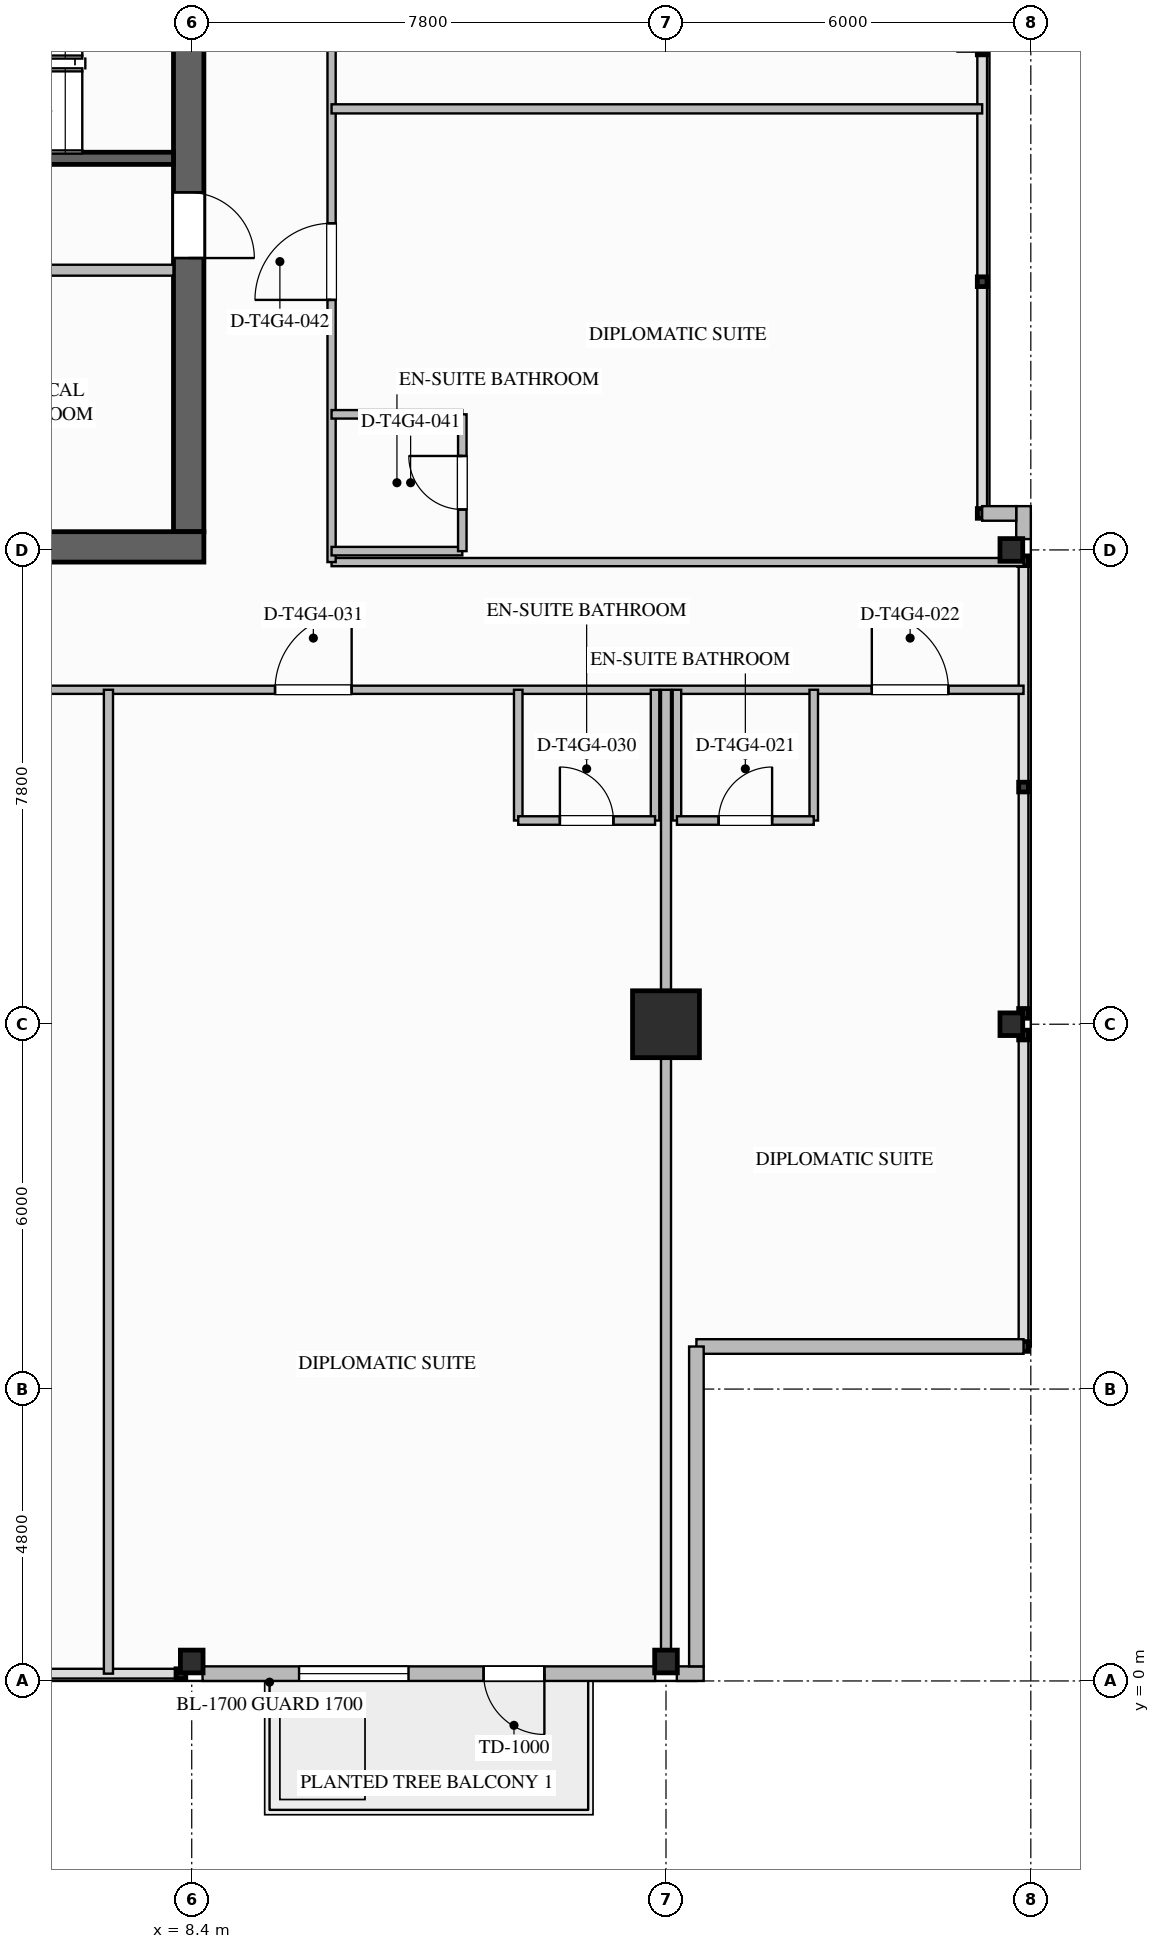
"""IFC4 building model, lengths in metres.
Left out: names, types, materials, properties, quantities, classifications, styles, units other than length and angle.
Written with IfcOpenShell. Run it as: python <this file> out.ifc"""

import sys

from ifc_helpers import new_model, si_unit, direction, frame, frame_2d, origin, origin_2d, place, context, subcontext, project, spatial, rectangle, i_section, extrude, element, fill, save


model = new_model("IFC4")
c1 = context("Model", 3, precision=1e-05, world=origin(), true_north=direction((0.0, 1.0)))
c2 = subcontext(c1, "Body", "Model", "MODEL_VIEW")
j1 = project(units=[si_unit("LENGTHUNIT", "METRE"), si_unit("PLANEANGLEUNIT", "RADIAN")], contexts=[c1])
p1 = place(None, origin())
s1 = spatial("IfcSite", under=j1, at=p1, CompositionType="ELEMENT")
p2 = place(p1, origin())
s2 = spatial("IfcBuilding", under=s1, at=p2, CompositionType="ELEMENT")
p3 = place(p2, frame((0.0, 0.0, 237.5)))
s3 = spatial("IfcBuildingStorey", under=s2, at=p3, CompositionType="ELEMENT", Elevation=237.5)
p4 = place(p3, frame((8.35, 35.1, 0.0), z_axis=(0.0, 0.0, 1.0), x_axis=(0.0, -1.0, 0.0)))
e1 = element("IfcWall", 1, at=p4, inside=s3, PredefinedType="SHEAR", context=c2, shape_type="SweptSolid", body=[
    extrude(rectangle(XDim=16.2, YDim=0.5, at=frame_2d((8.1, 0.0))), origin(), (0.0, 0.0, 1.0), 3.6),
])
p5 = place(p4, frame((3.08, 0.0, 0.0)))
e2 = element("IfcOpeningElement", 2, at=p5, cuts=e1, PredefinedType="OPENING", context=c2, shape_type="SweptSolid", body=[
    extrude(rectangle(XDim=1.12, YDim=2.1, at=frame_2d((0.56, 1.05))), frame((0.0, 0.26, 0.0), z_axis=(0.0, -1.0, 0.0), x_axis=(1.0, 0.0, 0.0)), (0.0, 0.0, 1.0), 0.52),
])
p6 = place(p4, frame((10.62, 0.0, 0.0)))
e3 = element("IfcOpeningElement", 3, at=p6, cuts=e1, PredefinedType="OPENING", context=c2, shape_type="SweptSolid", body=[
    extrude(rectangle(XDim=1.08, YDim=2.04, at=frame_2d((0.54, 1.02))), frame((0.0, 0.26, 0.0), z_axis=(0.0, -1.0, 0.0), x_axis=(1.0, 0.0, 0.0)), (0.0, 0.0, 1.0), 0.52),
])
p7 = place(p3, frame((8.6, 18.65, 0.0), z_axis=(0.0, 0.0, 1.0), x_axis=(-1.0, 0.0, 0.0)))
e4 = element("IfcWall", 4, at=p7, inside=s3, PredefinedType="SHEAR", context=c2, shape_type="SweptSolid", body=[
    extrude(rectangle(XDim=17.2, YDim=0.5, at=frame_2d((8.6, 0.0))), origin(), (0.0, 0.0, 1.0), 3.6),
])
p8 = place(p3, frame((16.2, 10.8, 0.0), z_axis=(0.0, 0.0, 1.0), x_axis=(1.0, 0.0, 0.0)))
e5 = element("IfcColumn", 5, at=p8, inside=s3, PredefinedType="COLUMN", context=c2, shape_type="SweptSolid", body=[
    extrude(rectangle(XDim=1.1, YDim=1.1, at=origin_2d()), origin(), (0.0, 0.0, 1.0), 3.6),
])
for number, where, z_axis, x_axis in (
    (6, (21.88, 10.8, 0.0), (0.0, 0.0, 1.0), (1.0, 0.0, 0.0)),
    (7, (21.88, 18.6, 0.0), (0.0, 0.0, 1.0), (1.0, 0.0, 0.0)),
    (8, (8.4, 0.32, 0.0), (0.0, 0.0, 1.0), (0.0, 1.0, 0.0)),
    (9, (16.2, 0.32, 0.0), (0.0, 0.0, 1.0), (0.0, 1.0, 0.0)),
):
    element("IfcColumn", number, at=place(p3, frame(where, z_axis=z_axis, x_axis=x_axis)), inside=s3, PredefinedType="COLUMN", context=c2, shape_type="SweptSolid", body=[
        extrude(i_section(OverallWidth=0.374, OverallDepth=0.372, WebThickness=0.016, FlangeThickness=0.026, FilletRadius=0.025, at=origin_2d()), origin(), (0.0, 0.0, 1.0), 3.597),
    ])
p9 = place(p3, frame((22.08, 19.32, 0.0), z_axis=(0.0, 0.0, 1.0), x_axis=(0.0, -1.0, 0.0)))
e10 = element("IfcWall", 10, at=p9, inside=s3, PredefinedType="STANDARD", context=c2, shape_type="SweptSolid", body=[
    extrude(rectangle(XDim=0.542, YDim=0.24, at=frame_2d((0.271, 0.0))), origin(), (0.0, 0.0, 1.0), 3.34),
])
p10 = place(p3, frame((16.022, 0.12, 0.0), z_axis=(0.0, 0.0, 1.0), x_axis=(-1.0, 0.0, 0.0)))
e11 = element("IfcWall", 11, at=p10, inside=s3, PredefinedType="STANDARD", context=c2, shape_type="SweptSolid", body=[
    extrude(rectangle(XDim=7.444, YDim=0.24, at=frame_2d((3.722, 0.0))), origin(), (0.0, 0.0, 1.0), 2.803),
])
p11 = place(p10, frame((1.822, 0.0, 0.0)))
e12 = element("IfcOpeningElement", 12, at=p11, cuts=e11, PredefinedType="OPENING", context=c2, shape_type="SweptSolid", body=[
    extrude(rectangle(XDim=1.0, YDim=2.2, at=frame_2d((0.5, 1.1))), frame((0.0, 0.13, 0.0), z_axis=(0.0, -1.0, 0.0), x_axis=(1.0, 0.0, 0.0)), (0.0, 0.0, 1.0), 0.26),
])
p12 = place(p10, frame((4.057, 0.0, 0.75)))
e13 = element("IfcOpeningElement", 13, at=p12, cuts=e11, PredefinedType="OPENING", context=c2, shape_type="SweptSolid", body=[
    extrude(rectangle(XDim=1.8, YDim=1.953, at=frame_2d((0.9, 0.977))), frame((0.0, 0.13, 0.0), z_axis=(0.0, -1.0, 0.0), x_axis=(1.0, 0.0, 0.0)), (0.0, 0.0, 1.0), 0.26),
])
p13 = place(p3, frame((16.82, 0.12, 0.0), z_axis=(0.0, 0.0, 1.0), x_axis=(-1.0, 0.0, 0.0)))
e14 = element("IfcWall", 14, at=p13, inside=s3, PredefinedType="STANDARD", context=c2, shape_type="SweptSolid", body=[
    extrude(rectangle(XDim=0.442, YDim=0.24, at=frame_2d((0.221, 0.0))), origin(), (0.0, 0.0, 1.0), 3.34),
])
p14 = place(p3, frame((22.08, 5.5, 0.0), z_axis=(0.0, 0.0, 1.0), x_axis=(-1.0, 0.0, 0.0)))
e15 = element("IfcWall", 15, at=p14, inside=s3, PredefinedType="STANDARD", context=c2, shape_type="SweptSolid", body=[
    extrude(rectangle(XDim=5.38, YDim=0.24, at=frame_2d((2.69, 0.0))), origin(), (0.0, 0.0, 1.0), 3.34),
])
p15 = place(p3, frame((16.7, 5.5, 0.0), z_axis=(0.0, 0.0, 1.0), x_axis=(0.0, -1.0, 0.0)))
e16 = element("IfcWall", 16, at=p15, inside=s3, PredefinedType="STANDARD", context=c2, shape_type="SweptSolid", body=[
    extrude(rectangle(XDim=5.26, YDim=0.24, at=frame_2d((2.63, 0.0))), origin(), (0.0, 0.0, 1.0), 3.34),
])
p16 = place(p3, frame((21.4, 19.2, 0.0), z_axis=(0.0, 0.0, 1.0), x_axis=(1.0, 0.0, 0.0)))
e17 = element("IfcWall", 17, at=p16, inside=s3, PredefinedType="STANDARD", context=c2, shape_type="SweptSolid", body=[
    extrude(rectangle(XDim=0.56, YDim=0.24, at=frame_2d((0.28, 0.0))), origin(), (0.0, 0.0, 1.0), 3.34),
])
p17 = place(p3, frame((0.0, 25.04, 0.0), z_axis=(0.0, 0.0, 1.0), x_axis=(1.0, 0.0, 0.0)))
e18 = element("IfcWall", 18, at=p17, inside=s3, PredefinedType="SOLIDWALL", context=c2, shape_type="SweptSolid", body=[
    extrude(rectangle(XDim=8.1, YDim=0.2, at=frame_2d((4.05, 0.0))), origin(), (0.0, 0.0, 1.0), 3.34),
])
p18 = place(p3, frame((-8.1, 23.2, 0.0), z_axis=(0.0, 0.0, 1.0), x_axis=(1.0, 0.0, 0.0)))
e19 = element("IfcWall", 19, at=p18, inside=s3, PredefinedType="SOLIDWALL", context=c2, shape_type="SweptSolid", body=[
    extrude(rectangle(XDim=16.2, YDim=0.18, at=frame_2d((8.1, 0.0))), origin(), (0.0, 0.0, 1.0), 3.34),
])
p19 = place(p18, frame((1.8, 0.0, 0.0)))
e20 = element("IfcOpeningElement", 20, at=p19, cuts=e19, PredefinedType="OPENING", context=c2, shape_type="SweptSolid", body=[
    extrude(rectangle(XDim=1.0, YDim=2.1, at=frame_2d((0.5, 1.05))), frame((0.0, 0.1, 0.0), z_axis=(0.0, -1.0, 0.0), x_axis=(1.0, 0.0, 0.0)), (0.0, 0.0, 1.0), 0.2),
])
p20 = place(p18, frame((7.6, 0.0, 0.0)))
e21 = element("IfcOpeningElement", 21, at=p20, cuts=e19, PredefinedType="OPENING", context=c2, shape_type="SweptSolid", body=[
    extrude(rectangle(XDim=1.0, YDim=2.1, at=frame_2d((0.5, 1.05))), frame((0.0, 0.1, 0.0), z_axis=(0.0, -1.0, 0.0), x_axis=(1.0, 0.0, 0.0)), (0.0, 0.0, 1.0), 0.2),
])
p21 = place(p18, frame((13.0, 0.0, 0.0)))
e22 = element("IfcOpeningElement", 22, at=p21, cuts=e19, PredefinedType="OPENING", context=c2, shape_type="SweptSolid", body=[
    extrude(rectangle(XDim=1.0, YDim=2.1, at=frame_2d((0.5, 1.05))), frame((0.0, 0.1, 0.0), z_axis=(0.0, -1.0, 0.0), x_axis=(1.0, 0.0, 0.0)), (0.0, 0.0, 1.0), 0.2),
])
p22 = place(p3, frame((-16.2, 16.3, 0.0), z_axis=(0.0, 0.0, 1.0), x_axis=(1.0, 0.0, 0.0)))
e23 = element("IfcWall", 23, at=p22, inside=s3, PredefinedType="PARTITIONING", context=c2, shape_type="SweptSolid", body=[
    extrude(rectangle(XDim=38.28, YDim=0.135, at=frame_2d((19.14, 0.0))), origin(), (0.0, 0.0, 1.0), 3.34),
])
p23 = place(p22, frame((35.785, 0.0, 0.0)))
e24 = element("IfcOpeningElement", 24, at=p23, cuts=e23, PredefinedType="OPENING", context=c2, shape_type="SweptSolid", body=[
    extrude(rectangle(XDim=1.26, YDim=2.2, at=frame_2d((0.63, 1.1))), frame((0.0, 0.077, 0.0), z_axis=(0.0, -1.0, 0.0), x_axis=(1.0, 0.0, 0.0)), (0.0, 0.0, 1.0), 0.155),
])
p24 = place(p22, frame((3.947, 0.0, 0.0)))
e25 = element("IfcOpeningElement", 25, at=p24, cuts=e23, PredefinedType="OPENING", context=c2, shape_type="SweptSolid", body=[
    extrude(rectangle(XDim=1.26, YDim=2.2, at=frame_2d((0.63, 1.1))), frame((0.0, 0.077, 0.0), z_axis=(0.0, -1.0, 0.0), x_axis=(1.0, 0.0, 0.0)), (0.0, 0.0, 1.0), 0.155),
])
p25 = place(p22, frame((11.105, 0.0, 0.0)))
e26 = element("IfcOpeningElement", 26, at=p25, cuts=e23, PredefinedType="OPENING", context=c2, shape_type="SweptSolid", body=[
    extrude(rectangle(XDim=1.02, YDim=2.15, at=frame_2d((0.51, 1.075))), frame((0.0, 0.077, 0.0), z_axis=(0.0, -1.0, 0.0), x_axis=(1.0, 0.0, 0.0)), (0.0, 0.0, 1.0), 0.155),
])
p26 = place(p22, frame((20.453, 0.0, 0.0)))
e27 = element("IfcOpeningElement", 27, at=p26, cuts=e23, PredefinedType="OPENING", context=c2, shape_type="SweptSolid", body=[
    extrude(rectangle(XDim=1.26, YDim=2.2, at=frame_2d((0.63, 1.1))), frame((0.0, 0.077, 0.0), z_axis=(0.0, -1.0, 0.0), x_axis=(1.0, 0.0, 0.0)), (0.0, 0.0, 1.0), 0.155),
])
p27 = place(p22, frame((25.97, 0.0, 0.0)))
e28 = element("IfcOpeningElement", 28, at=p27, cuts=e23, PredefinedType="OPENING", context=c2, shape_type="SweptSolid", body=[
    extrude(rectangle(XDim=1.26, YDim=2.2, at=frame_2d((0.63, 1.1))), frame((0.0, 0.077, 0.0), z_axis=(0.0, -1.0, 0.0), x_axis=(1.0, 0.0, 0.0)), (0.0, 0.0, 1.0), 0.155),
])
p28 = place(p3, frame((10.7, 18.4, 0.0), z_axis=(0.0, 0.0, 1.0), x_axis=(1.0, 0.0, 0.0)))
e29 = element("IfcWall", 29, at=p28, inside=s3, PredefinedType="PARTITIONING", context=c2, shape_type="SweptSolid", body=[
    extrude(rectangle(XDim=11.38, YDim=0.135, at=frame_2d((5.69, 0.0))), origin(), (0.0, 0.0, 1.0), 2.717),
])
p29 = place(p3, frame((10.7, 18.4, 0.0), z_axis=(0.0, 0.0, 1.0), x_axis=(0.0, 1.0, 0.0)))
e30 = element("IfcWall", 30, at=p29, inside=s3, PredefinedType="PARTITIONING", context=c2, shape_type="SweptSolid", body=[
    extrude(rectangle(XDim=17.2, YDim=0.135, at=frame_2d((8.6, 0.0))), origin(), (0.0, 0.0, 1.0), 3.34),
])
p30 = place(p29, frame((4.312, 0.0, 0.0)))
e31 = element("IfcOpeningElement", 31, at=p30, cuts=e30, PredefinedType="OPENING", context=c2, shape_type="SweptSolid", body=[
    extrude(rectangle(XDim=1.26, YDim=2.2, at=frame_2d((0.63, 1.1))), frame((0.0, 0.077, 0.0), z_axis=(0.0, -1.0, 0.0), x_axis=(1.0, 0.0, 0.0)), (0.0, 0.0, 1.0), 0.155),
])
p31 = place(p29, frame((10.482, 0.0, 0.0)))
e32 = element("IfcOpeningElement", 32, at=p31, cuts=e30, PredefinedType="OPENING", context=c2, shape_type="SweptSolid", body=[
    extrude(rectangle(XDim=1.26, YDim=2.2, at=frame_2d((0.63, 1.1))), frame((0.0, 0.077, 0.0), z_axis=(0.0, -1.0, 0.0), x_axis=(1.0, 0.0, 0.0)), (0.0, 0.0, 1.0), 0.155),
])
p32 = place(p3, frame((16.2, 0.12, 0.0), z_axis=(0.0, 0.0, 1.0), x_axis=(0.0, 1.0, 0.0)))
e33 = element("IfcWall", 33, at=p32, inside=s3, PredefinedType="PARTITIONING", context=c2, shape_type="SweptSolid", body=[
    extrude(rectangle(XDim=16.18, YDim=0.165, at=frame_2d((8.09, 0.0))), origin(), (0.0, 0.0, 1.0), 2.714),
])
p33 = place(p3, frame((16.38, 16.3, 0.0), z_axis=(0.0, 0.0, 1.0), x_axis=(0.0, -1.0, 0.0)))
e34 = element("IfcWall", 34, at=p33, inside=s3, PredefinedType="PLUMBINGWALL", context=c2, shape_type="SweptSolid", body=[
    extrude(rectangle(XDim=2.15, YDim=0.14, at=frame_2d((1.075, 0.0))), origin(), (0.0, 0.0, 1.0), 2.714),
])
p34 = place(p3, frame((18.63, 16.3, 0.0), z_axis=(0.0, 0.0, 1.0), x_axis=(0.0, -1.0, 0.0)))
e35 = element("IfcWall", 35, at=p34, inside=s3, PredefinedType="PLUMBINGWALL", context=c2, shape_type="SweptSolid", body=[
    extrude(rectangle(XDim=2.15, YDim=0.14, at=frame_2d((1.075, 0.0))), origin(), (0.0, 0.0, 1.0), 3.34),
])
p35 = place(p3, frame((16.38, 14.15, 0.0), z_axis=(0.0, 0.0, 1.0), x_axis=(1.0, 0.0, 0.0)))
e36 = element("IfcWall", 36, at=p35, inside=s3, PredefinedType="PLUMBINGWALL", context=c2, shape_type="SweptSolid", body=[
    extrude(rectangle(XDim=2.25, YDim=0.14, at=frame_2d((1.125, 0.0))), origin(), (0.0, 0.0, 1.0), 3.34),
])
p36 = place(p35, frame((0.685, 0.0, 0.0)))
e37 = element("IfcOpeningElement", 37, at=p36, cuts=e36, PredefinedType="OPENING", context=c2, shape_type="SweptSolid", body=[
    extrude(rectangle(XDim=0.88, YDim=2.1, at=frame_2d((0.44, 1.05))), frame((0.0, 0.08, 0.0), z_axis=(0.0, -1.0, 0.0), x_axis=(1.0, 0.0, 0.0)), (0.0, 0.0, 1.0), 0.16),
])
p37 = place(p3, frame((7.03, 0.12, 0.0), z_axis=(0.0, 0.0, 1.0), x_axis=(0.0, 1.0, 0.0)))
e38 = element("IfcWall", 38, at=p37, inside=s3, PredefinedType="PARTITIONING", context=c2, shape_type="SweptSolid", body=[
    extrude(rectangle(XDim=16.18, YDim=0.15, at=frame_2d((8.09, 0.0))), origin(), (0.0, 0.0, 1.0), 3.34),
])
p38 = place(p3, frame((13.77, 16.3, 0.0), z_axis=(0.0, 0.0, 1.0), x_axis=(0.0, -1.0, 0.0)))
e39 = element("IfcWall", 39, at=p38, inside=s3, PredefinedType="PLUMBINGWALL", context=c2, shape_type="SweptSolid", body=[
    extrude(rectangle(XDim=2.15, YDim=0.14, at=frame_2d((1.075, 0.0))), origin(), (0.0, 0.0, 1.0), 3.34),
])
p39 = place(p3, frame((16.02, 16.3, 0.0), z_axis=(0.0, 0.0, 1.0), x_axis=(0.0, -1.0, 0.0)))
e40 = element("IfcWall", 40, at=p39, inside=s3, PredefinedType="PLUMBINGWALL", context=c2, shape_type="SweptSolid", body=[
    extrude(rectangle(XDim=2.15, YDim=0.14, at=frame_2d((1.075, 0.0))), origin(), (0.0, 0.0, 1.0), 2.714),
])
p40 = place(p3, frame((13.77, 14.15, 0.0), z_axis=(0.0, 0.0, 1.0), x_axis=(1.0, 0.0, 0.0)))
e41 = element("IfcWall", 41, at=p40, inside=s3, PredefinedType="PLUMBINGWALL", context=c2, shape_type="SweptSolid", body=[
    extrude(rectangle(XDim=2.25, YDim=0.14, at=frame_2d((1.125, 0.0))), origin(), (0.0, 0.0, 1.0), 3.34),
])
p41 = place(p40, frame((0.685, 0.0, 0.0)))
e42 = element("IfcOpeningElement", 42, at=p41, cuts=e41, PredefinedType="OPENING", context=c2, shape_type="SweptSolid", body=[
    extrude(rectangle(XDim=0.88, YDim=2.1, at=frame_2d((0.44, 1.05))), frame((0.0, 0.08, 0.0), z_axis=(0.0, -1.0, 0.0), x_axis=(1.0, 0.0, 0.0)), (0.0, 0.0, 1.0), 0.16),
])
p42 = place(p3, frame((10.7, 18.58, 0.0), z_axis=(0.0, 0.0, 1.0), x_axis=(1.0, 0.0, 0.0)))
e43 = element("IfcWall", 43, at=p42, inside=s3, PredefinedType="PLUMBINGWALL", context=c2, shape_type="SweptSolid", body=[
    extrude(rectangle(XDim=2.15, YDim=0.14, at=frame_2d((1.075, 0.0))), origin(), (0.0, 0.0, 1.0), 2.717),
])
p43 = place(p3, frame((10.7, 20.83, 0.0), z_axis=(0.0, 0.0, 1.0), x_axis=(1.0, 0.0, 0.0)))
e44 = element("IfcWall", 44, at=p43, inside=s3, PredefinedType="PLUMBINGWALL", context=c2, shape_type="SweptSolid", body=[
    extrude(rectangle(XDim=2.15, YDim=0.14, at=frame_2d((1.075, 0.0))), origin(), (0.0, 0.0, 1.0), 3.34),
])
p44 = place(p3, frame((12.85, 18.58, 0.0), z_axis=(0.0, 0.0, 1.0), x_axis=(0.0, 1.0, 0.0)))
e45 = element("IfcWall", 45, at=p44, inside=s3, PredefinedType="PLUMBINGWALL", context=c2, shape_type="SweptSolid", body=[
    extrude(rectangle(XDim=2.25, YDim=0.14, at=frame_2d((1.125, 0.0))), origin(), (0.0, 0.0, 1.0), 3.34),
])
p45 = place(p44, frame((0.685, 0.0, 0.0)))
e46 = element("IfcOpeningElement", 46, at=p45, cuts=e45, PredefinedType="OPENING", context=c2, shape_type="SweptSolid", body=[
    extrude(rectangle(XDim=0.88, YDim=2.1, at=frame_2d((0.44, 1.05))), frame((0.0, 0.08, 0.0), z_axis=(0.0, -1.0, 0.0), x_axis=(1.0, 0.0, 0.0)), (0.0, 0.0, 1.0), 0.16),
])
p46 = place(p3, frame((10.7, 25.853, 0.0), z_axis=(0.0, 0.0, 1.0), x_axis=(1.0, 0.0, 0.0)))
e47 = element("IfcWall", 47, at=p46, inside=s3, PredefinedType="PARTITIONING", context=c2, shape_type="SweptSolid", body=[
    extrude(rectangle(XDim=10.7, YDim=0.15, at=frame_2d((5.35, 0.0))), origin(), (0.0, 0.0, 1.0), 3.34),
])
p47 = place(p11, origin())
e48 = element("IfcDoor", 48, at=p47, inside=s3, OperationType="SINGLE_SWING_LEFT", PredefinedType="DOOR", context=c2, shape_type="SweptSolid", body=[
    extrude(rectangle(XDim=1.0, YDim=2.2, at=frame_2d((0.5, 1.1))), frame((0.0, 0.025, 0.0), z_axis=(0.0, -1.0, 0.0), x_axis=(1.0, 0.0, 0.0)), (0.0, 0.0, 1.0), 0.05),
])
fill(e12, e48)
p48 = place(p12, origin())
e49 = element("IfcWindow", 49, at=p48, inside=s3, PartitioningType="SINGLE_PANEL", PredefinedType="WINDOW", context=c2, shape_type="SweptSolid", body=[
    extrude(rectangle(XDim=1.8, YDim=1.953, at=frame_2d((0.9, 0.977))), frame((0.0, 0.03, 0.0), z_axis=(0.0, -1.0, 0.0), x_axis=(1.0, 0.0, 0.0)), (0.0, 0.0, 1.0), 0.06),
])
fill(e13, e49)
p49 = place(p6, origin())
e50 = element("IfcDoor", 50, at=p49, inside=s3, OperationType="SINGLE_SWING_RIGHT", PredefinedType="DOOR", context=c2, shape_type="SweptSolid", body=[
    extrude(rectangle(XDim=1.08, YDim=2.04, at=frame_2d((0.54, 1.02))), frame((0.0, 0.025, 0.0), z_axis=(0.0, -1.0, 0.0), x_axis=(1.0, 0.0, 0.0)), (0.0, 0.0, 1.0), 0.05),
])
fill(e3, e50)
p50 = place(p36, origin())
e51 = element("IfcDoor", 51, at=p50, inside=s3, OperationType="SINGLE_SWING_RIGHT", PredefinedType="DOOR", context=c2, shape_type="SweptSolid", body=[
    extrude(rectangle(XDim=0.88, YDim=2.1, at=frame_2d((0.44, 1.05))), frame((0.0, 0.025, 0.0), z_axis=(0.0, -1.0, 0.0), x_axis=(1.0, 0.0, 0.0)), (0.0, 0.0, 1.0), 0.05),
])
fill(e37, e51)
p51 = place(p23, origin())
e52 = element("IfcDoor", 52, at=p51, inside=s3, OperationType="SINGLE_SWING_LEFT", PredefinedType="DOOR", context=c2, shape_type="SweptSolid", body=[
    extrude(rectangle(XDim=1.26, YDim=2.2, at=frame_2d((0.63, 1.1))), frame((0.0, 0.025, 0.0), z_axis=(0.0, -1.0, 0.0), x_axis=(1.0, 0.0, 0.0)), (0.0, 0.0, 1.0), 0.05),
])
fill(e24, e52)
p52 = place(p41, origin())
e53 = element("IfcDoor", 53, at=p52, inside=s3, OperationType="SINGLE_SWING_LEFT", PredefinedType="DOOR", context=c2, shape_type="SweptSolid", body=[
    extrude(rectangle(XDim=0.88, YDim=2.1, at=frame_2d((0.44, 1.05))), frame((0.0, 0.025, 0.0), z_axis=(0.0, -1.0, 0.0), x_axis=(1.0, 0.0, 0.0)), (0.0, 0.0, 1.0), 0.05),
])
fill(e42, e53)
p53 = place(p27, origin())
e54 = element("IfcDoor", 54, at=p53, inside=s3, OperationType="SINGLE_SWING_RIGHT", PredefinedType="DOOR", context=c2, shape_type="SweptSolid", body=[
    extrude(rectangle(XDim=1.26, YDim=2.2, at=frame_2d((0.63, 1.1))), frame((0.0, 0.025, 0.0), z_axis=(0.0, -1.0, 0.0), x_axis=(1.0, 0.0, 0.0)), (0.0, 0.0, 1.0), 0.05),
])
fill(e28, e54)
p54 = place(p45, origin())
e55 = element("IfcDoor", 55, at=p54, inside=s3, OperationType="SINGLE_SWING_RIGHT", PredefinedType="DOOR", context=c2, shape_type="SweptSolid", body=[
    extrude(rectangle(XDim=0.88, YDim=2.1, at=frame_2d((0.44, 1.05))), frame((0.0, 0.025, 0.0), z_axis=(0.0, -1.0, 0.0), x_axis=(1.0, 0.0, 0.0)), (0.0, 0.0, 1.0), 0.05),
])
fill(e46, e55)
p55 = place(p30, origin())
e56 = element("IfcDoor", 56, at=p55, inside=s3, OperationType="SINGLE_SWING_LEFT", PredefinedType="DOOR", context=c2, shape_type="SweptSolid", body=[
    extrude(rectangle(XDim=1.26, YDim=2.2, at=frame_2d((0.63, 1.1))), frame((0.0, 0.025, 0.0), z_axis=(0.0, -1.0, 0.0), x_axis=(1.0, 0.0, 0.0)), (0.0, 0.0, 1.0), 0.05),
])
fill(e31, e56)
save(model, sys.argv[1])
